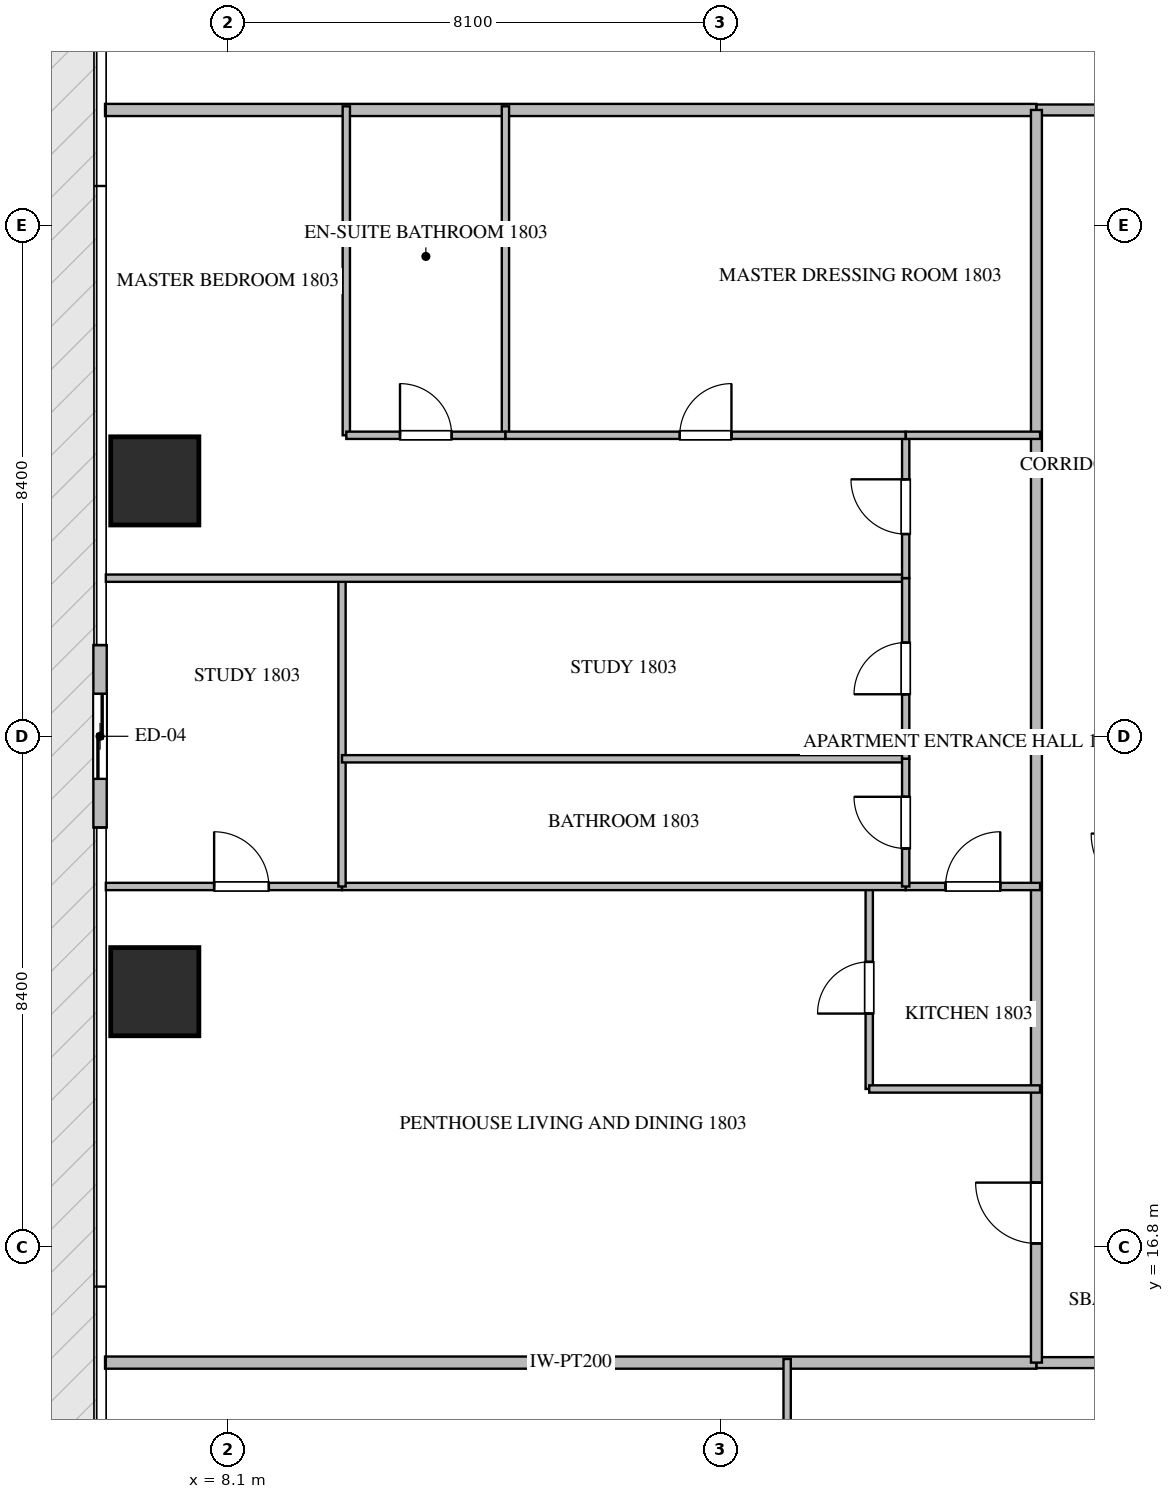
"""IFC4 building model, lengths in metres.
Left out: names, types, materials, properties, quantities, classifications, styles, units other than length and angle.
Written with IfcOpenShell. Run it as: python <this file> out.ifc"""

import sys

from ifc_helpers import new_model, si_unit, direction, frame, frame_2d, origin, origin_2d, place, context, subcontext, project, spatial, rectangle, extrude, source, transform, mapped, element, fill, save


model = new_model("IFC4")
c1 = context("Model", 3, precision=1e-05, world=origin(), true_north=direction((0.0, 1.0)))
c2 = subcontext(c1, "Body", "Model", "MODEL_VIEW")
j1 = project(units=[si_unit("LENGTHUNIT", "METRE"), si_unit("PLANEANGLEUNIT", "RADIAN")], contexts=[c1])
p1 = place(None, origin())
s1 = spatial("IfcSite", under=j1, at=p1, CompositionType="ELEMENT")
p2 = place(p1, origin())
s2 = spatial("IfcBuilding", under=s1, at=p2, CompositionType="ELEMENT")
p3 = place(p2, frame((0.0, 0.0, 75.45)))
s3 = spatial("IfcBuildingStorey", under=s2, at=p3, CompositionType="ELEMENT", Elevation=75.45)
m1 = source(origin(), c2, "Body", "SweptSolid", [
    extrude(rectangle(XDim=1.45, YDim=1.45, at=origin_2d()), origin(), (0.0, 0.0, 1.0), 3.75),
])
for number, where, z_axis, x_axis in (
    (1, (6.9, 21.0, -0.26), (0.0, 0.0, 1.0), (1.0, 0.0, 0.0)),
    (2, (6.9, 29.4, -0.26), (0.0, 0.0, 1.0), (1.0, 0.0, 0.0)),
):
    element("IfcColumn", number, at=place(p3, frame(where, z_axis=z_axis, x_axis=x_axis)), inside=s3, PredefinedType="COLUMN", context=c2, shape_type="MappedRepresentation", body=[
        mapped(m1, transform((0.0, 0.0, 0.0), scale=1.0)),
    ])
p4 = place(p3, frame((6.0, 26.7, 0.0), z_axis=(0.0, 0.0, 1.0), x_axis=(0.0, -1.0, 0.0)))
e3 = element("IfcWall", 3, at=p4, inside=s3, PredefinedType="ELEMENTEDWALL", context=c2, shape_type="SweptSolid", body=[
    extrude(rectangle(XDim=3.0, YDim=0.22, at=frame_2d((1.5, 0.0))), origin(), (0.0, 0.0, 1.0), 3.475),
])
p5 = place(p4, frame((0.8, 0.0, 0.0)))
e4 = element("IfcOpeningElement", 4, at=p5, cuts=e3, PredefinedType="OPENING", context=c2, shape_type="SweptSolid", body=[
    extrude(rectangle(XDim=1.4, YDim=2.25, at=frame_2d((0.7, 1.125))), frame((0.0, 0.12, 0.0), z_axis=(0.0, -1.0, 0.0), x_axis=(1.0, 0.0, 0.0)), (0.0, 0.0, 1.0), 0.24),
])
for number, where, z_axis, x_axis in (
    (5, (6.082, 14.9, 0.0), (0.0, 0.0, 1.0), (1.0, 0.0, 0.0)),
    (6, (6.082, 35.5, 0.0), (0.0, 0.0, 1.0), (1.0, 0.0, 0.0)),
):
    element("IfcWall", number, at=place(p3, frame(where, z_axis=z_axis, x_axis=x_axis)), inside=s3, PredefinedType="PARTITIONING", context=c2, shape_type="SweptSolid", body=[
        extrude(rectangle(XDim=15.318, YDim=0.2, at=frame_2d((7.659, 0.0))), origin(), (0.0, 0.0, 1.0), 3.49),
    ])
p6 = place(p3, frame((21.402, 14.9, 0.0), z_axis=(0.0, 0.0, 1.0), x_axis=(1.0, 0.0, 0.0)))
e7 = element("IfcWall", 7, at=p6, inside=s3, PredefinedType="PARTITIONING", context=c2, shape_type="SweptSolid", body=[
    extrude(rectangle(XDim=21.996, YDim=0.18, at=frame_2d((10.998, 0.0))), origin(), (0.0, 0.0, 1.0), 3.49),
])
p7 = place(p6, frame((7.202, 0.0, 0.0)))
e8 = element("IfcOpeningElement", 8, at=p7, cuts=e7, PredefinedType="OPENING", context=c2, shape_type="SweptSolid", body=[
    extrude(rectangle(XDim=1.0, YDim=2.15, at=frame_2d((0.5, 1.075))), frame((0.0, 0.1, 0.0), z_axis=(0.0, -1.0, 0.0), x_axis=(1.0, 0.0, 0.0)), (0.0, 0.0, 1.0), 0.2),
])
p8 = place(p3, frame((21.402, 35.5, 0.0), z_axis=(0.0, 0.0, 1.0), x_axis=(1.0, 0.0, 0.0)))
e9 = element("IfcWall", 9, at=p8, inside=s3, PredefinedType="PARTITIONING", context=c2, shape_type="SweptSolid", body=[
    extrude(rectangle(XDim=21.996, YDim=0.18, at=frame_2d((10.998, 0.0))), origin(), (0.0, 0.0, 1.0), 3.49),
])
p9 = place(p8, frame((15.222, 0.0, 0.0)))
e10 = element("IfcOpeningElement", 10, at=p9, cuts=e9, PredefinedType="OPENING", context=c2, shape_type="SweptSolid", body=[
    extrude(rectangle(XDim=1.0, YDim=2.15, at=frame_2d((0.5, 1.075))), frame((0.0, 0.1, 0.0), z_axis=(0.0, -1.0, 0.0), x_axis=(1.0, 0.0, 0.0)), (0.0, 0.0, 1.0), 0.2),
])
p10 = place(p3, frame((21.4, 14.9, 0.0), z_axis=(0.0, 0.0, 1.0), x_axis=(0.0, 1.0, 0.0)))
e11 = element("IfcWall", 11, at=p10, inside=s3, PredefinedType="PARTITIONING", context=c2, shape_type="SweptSolid", body=[
    extrude(rectangle(XDim=20.6, YDim=0.18, at=frame_2d((10.3, 0.0))), origin(), (0.0, 0.0, 1.0), 3.49),
])
p11 = place(p10, frame((1.96, 0.0, 0.0)))
e12 = element("IfcOpeningElement", 12, at=p11, cuts=e11, PredefinedType="OPENING", context=c2, shape_type="SweptSolid", body=[
    extrude(rectangle(XDim=1.0, YDim=2.15, at=frame_2d((0.5, 1.075))), frame((0.0, 0.1, 0.0), z_axis=(0.0, -1.0, 0.0), x_axis=(1.0, 0.0, 0.0)), (0.0, 0.0, 1.0), 0.2),
])
p12 = place(p3, frame((17.3, 12.752, 0.0), z_axis=(0.0, 0.0, 1.0), x_axis=(0.0, 1.0, 0.0)))
e13 = element("IfcWall", 13, at=p12, inside=s3, PredefinedType="PARTITIONING", context=c2, shape_type="SweptSolid", body=[
    extrude(rectangle(XDim=2.208, YDim=0.12, at=frame_2d((1.104, 0.0))), origin(), (0.0, 0.0, 1.0), 3.49),
])
p13 = place(p3, frame((18.65, 19.4, 0.0), z_axis=(0.0, 0.0, 1.0), x_axis=(0.0, 1.0, 0.0)))
e14 = element("IfcWall", 14, at=p13, inside=s3, PredefinedType="PARTITIONING", context=c2, shape_type="SweptSolid", body=[
    extrude(rectangle(XDim=3.33, YDim=0.12, at=frame_2d((1.665, 0.0))), origin(), (0.0, 0.0, 1.0), 3.49),
])
p14 = place(p13, frame((1.24, 0.0, 0.0)))
e15 = element("IfcOpeningElement", 15, at=p14, cuts=e14, PredefinedType="OPENING", context=c2, shape_type="SweptSolid", body=[
    extrude(rectangle(XDim=0.85, YDim=2.1, at=frame_2d((0.425, 1.05))), frame((0.0, 0.07, 0.0), z_axis=(0.0, -1.0, 0.0), x_axis=(1.0, 0.0, 0.0)), (0.0, 0.0, 1.0), 0.14),
])
p15 = place(p3, frame((18.65, 19.4, 0.0), z_axis=(0.0, 0.0, 1.0), x_axis=(1.0, 0.0, 0.0)))
e16 = element("IfcWall", 16, at=p15, inside=s3, PredefinedType="PARTITIONING", context=c2, shape_type="SweptSolid", body=[
    extrude(rectangle(XDim=2.81, YDim=0.12, at=frame_2d((1.405, 0.0))), origin(), (0.0, 0.0, 1.0), 3.49),
])
p16 = place(p3, frame((19.25, 22.73, 0.0), z_axis=(0.0, 0.0, 1.0), x_axis=(1.0, 0.0, 0.0)))
e17 = element("IfcWall", 17, at=p16, inside=s3, PredefinedType="PARTITIONING", context=c2, shape_type="SweptSolid", body=[
    extrude(rectangle(XDim=2.21, YDim=0.12, at=frame_2d((1.105, 0.0))), origin(), (0.0, 0.0, 1.0), 3.49),
])
p17 = place(p16, frame((0.655, 0.0, 0.0)))
e18 = element("IfcOpeningElement", 18, at=p17, cuts=e17, PredefinedType="OPENING", context=c2, shape_type="SweptSolid", body=[
    extrude(rectangle(XDim=0.9, YDim=2.1, at=frame_2d((0.45, 1.05))), frame((0.0, 0.07, 0.0), z_axis=(0.0, -1.0, 0.0), x_axis=(1.0, 0.0, 0.0)), (0.0, 0.0, 1.0), 0.14),
])
p18 = place(p3, frame((6.095, 22.73, 0.0), z_axis=(0.0, 0.0, 1.0), x_axis=(1.0, 0.0, 0.0)))
e19 = element("IfcWall", 19, at=p18, inside=s3, PredefinedType="PARTITIONING", context=c2, shape_type="SweptSolid", body=[
    extrude(rectangle(XDim=3.884, YDim=0.12, at=frame_2d((1.942, 0.0))), origin(), (0.0, 0.0, 1.0), 3.49),
])
p19 = place(p18, frame((1.781, 0.0, 0.0)))
e20 = element("IfcOpeningElement", 20, at=p19, cuts=e19, PredefinedType="OPENING", context=c2, shape_type="SweptSolid", body=[
    extrude(rectangle(XDim=0.9, YDim=2.1, at=frame_2d((0.45, 1.05))), frame((0.0, 0.07, 0.0), z_axis=(0.0, -1.0, 0.0), x_axis=(1.0, 0.0, 0.0)), (0.0, 0.0, 1.0), 0.14),
])
p20 = place(p3, frame((9.981, 22.73, 0.0), z_axis=(0.0, 0.0, 1.0), x_axis=(1.0, 0.0, 0.0)))
e21 = element("IfcWall", 21, at=p20, inside=s3, PredefinedType="PARTITIONING", context=c2, shape_type="SweptSolid", body=[
    extrude(rectangle(XDim=9.267, YDim=0.12, at=frame_2d((4.634, 0.0))), origin(), (0.0, 0.0, 1.0), 3.49),
])
p21 = place(p3, frame((9.979, 22.73, 0.0), z_axis=(0.0, 0.0, 1.0), x_axis=(0.0, 1.0, 0.0)))
e22 = element("IfcWall", 22, at=p21, inside=s3, PredefinedType="PARTITIONING", context=c2, shape_type="SweptSolid", body=[
    extrude(rectangle(XDim=5.07, YDim=0.12, at=frame_2d((2.535, 0.0))), origin(), (0.0, 0.0, 1.0), 3.49),
])
p22 = place(p3, frame((6.095, 27.8, 0.0), z_axis=(0.0, 0.0, 1.0), x_axis=(1.0, 0.0, 0.0)))
e23 = element("IfcWall", 23, at=p22, inside=s3, PredefinedType="PARTITIONING", context=c2, shape_type="SweptSolid", body=[
    extrude(rectangle(XDim=13.155, YDim=0.12, at=frame_2d((6.578, 0.0))), origin(), (0.0, 0.0, 1.0), 3.49),
])
p23 = place(p3, frame((9.979, 24.83, 0.0), z_axis=(0.0, 0.0, 1.0), x_axis=(1.0, 0.0, 0.0)))
e24 = element("IfcWall", 24, at=p23, inside=s3, PredefinedType="PARTITIONING", context=c2, shape_type="SweptSolid", body=[
    extrude(rectangle(XDim=9.271, YDim=0.12, at=frame_2d((4.635, 0.0))), origin(), (0.0, 0.0, 1.0), 3.49),
])
p24 = place(p3, frame((19.25, 22.73, 0.0), z_axis=(0.0, 0.0, 1.0), x_axis=(0.0, 1.0, 0.0)))
e25 = element("IfcWall", 25, at=p24, inside=s3, PredefinedType="PARTITIONING", context=c2, shape_type="SweptSolid", body=[
    extrude(rectangle(XDim=2.1, YDim=0.12, at=frame_2d((1.05, 0.0))), origin(), (0.0, 0.0, 1.0), 3.49),
])
p25 = place(p24, frame((0.625, 0.0, 0.0)))
e26 = element("IfcOpeningElement", 26, at=p25, cuts=e25, PredefinedType="OPENING", context=c2, shape_type="SweptSolid", body=[
    extrude(rectangle(XDim=0.85, YDim=2.1, at=frame_2d((0.425, 1.05))), frame((0.0, 0.07, 0.0), z_axis=(0.0, -1.0, 0.0), x_axis=(1.0, 0.0, 0.0)), (0.0, 0.0, 1.0), 0.14),
])
p26 = place(p3, frame((19.25, 24.832, 0.0), z_axis=(0.0, 0.0, 1.0), x_axis=(0.0, 1.0, 0.0)))
e27 = element("IfcWall", 27, at=p26, inside=s3, PredefinedType="PARTITIONING", context=c2, shape_type="SweptSolid", body=[
    extrude(rectangle(XDim=2.968, YDim=0.12, at=frame_2d((1.484, 0.0))), origin(), (0.0, 0.0, 1.0), 3.49),
])
p27 = place(p26, frame((1.059, 0.0, 0.0)))
e28 = element("IfcOpeningElement", 28, at=p27, cuts=e27, PredefinedType="OPENING", context=c2, shape_type="SweptSolid", body=[
    extrude(rectangle(XDim=0.85, YDim=2.1, at=frame_2d((0.425, 1.05))), frame((0.0, 0.07, 0.0), z_axis=(0.0, -1.0, 0.0), x_axis=(1.0, 0.0, 0.0)), (0.0, 0.0, 1.0), 0.14),
])
p28 = place(p3, frame((19.25, 27.802, 0.0), z_axis=(0.0, 0.0, 1.0), x_axis=(0.0, 1.0, 0.0)))
e29 = element("IfcWall", 29, at=p28, inside=s3, PredefinedType="PARTITIONING", context=c2, shape_type="SweptSolid", body=[
    extrude(rectangle(XDim=2.348, YDim=0.12, at=frame_2d((1.174, 0.0))), origin(), (0.0, 0.0, 1.0), 3.49),
])
p29 = place(p28, frame((0.724, 0.0, 0.0)))
e30 = element("IfcOpeningElement", 30, at=p29, cuts=e29, PredefinedType="OPENING", context=c2, shape_type="SweptSolid", body=[
    extrude(rectangle(XDim=0.9, YDim=2.1, at=frame_2d((0.45, 1.05))), frame((0.0, 0.07, 0.0), z_axis=(0.0, -1.0, 0.0), x_axis=(1.0, 0.0, 0.0)), (0.0, 0.0, 1.0), 0.14),
])
for number, where, z_axis, x_axis in (
    (31, (10.05, 30.15, 0.0), (0.0, 0.0, 1.0), (0.0, 1.0, 0.0)),
    (32, (12.667, 30.15, 0.0), (0.0, 0.0, 1.0), (0.0, 1.0, 0.0)),
):
    element("IfcWall", number, at=place(p3, frame(where, z_axis=z_axis, x_axis=x_axis)), inside=s3, PredefinedType="PARTITIONING", context=c2, shape_type="SweptSolid", body=[
        extrude(rectangle(XDim=5.41, YDim=0.12, at=frame_2d((2.705, 0.0))), origin(), (0.0, 0.0, 1.0), 3.49),
    ])
p30 = place(p3, frame((10.05, 30.15, 0.0), z_axis=(0.0, 0.0, 1.0), x_axis=(1.0, 0.0, 0.0)))
e33 = element("IfcWall", 33, at=p30, inside=s3, PredefinedType="PARTITIONING", context=c2, shape_type="SweptSolid", body=[
    extrude(rectangle(XDim=2.617, YDim=0.12, at=frame_2d((1.309, 0.0))), origin(), (0.0, 0.0, 1.0), 3.49),
])
p31 = place(p30, frame((0.883, 0.0, 0.0)))
e34 = element("IfcOpeningElement", 34, at=p31, cuts=e33, PredefinedType="OPENING", context=c2, shape_type="SweptSolid", body=[
    extrude(rectangle(XDim=0.85, YDim=2.1, at=frame_2d((0.425, 1.05))), frame((0.0, 0.07, 0.0), z_axis=(0.0, -1.0, 0.0), x_axis=(1.0, 0.0, 0.0)), (0.0, 0.0, 1.0), 0.14),
])
p32 = place(p3, frame((12.669, 30.15, 0.0), z_axis=(0.0, 0.0, 1.0), x_axis=(1.0, 0.0, 0.0)))
e35 = element("IfcWall", 35, at=p32, inside=s3, PredefinedType="PARTITIONING", context=c2, shape_type="SweptSolid", body=[
    extrude(rectangle(XDim=6.581, YDim=0.12, at=frame_2d((3.291, 0.0))), origin(), (0.0, 0.0, 1.0), 3.49),
])
p33 = place(p32, frame((2.865, 0.0, 0.0)))
e36 = element("IfcOpeningElement", 36, at=p33, cuts=e35, PredefinedType="OPENING", context=c2, shape_type="SweptSolid", body=[
    extrude(rectangle(XDim=0.85, YDim=2.1, at=frame_2d((0.425, 1.05))), frame((0.0, 0.07, 0.0), z_axis=(0.0, -1.0, 0.0), x_axis=(1.0, 0.0, 0.0)), (0.0, 0.0, 1.0), 0.14),
])
p34 = place(p3, frame((19.252, 30.15, 0.0), z_axis=(0.0, 0.0, 1.0), x_axis=(1.0, 0.0, 0.0)))
e37 = element("IfcWall", 37, at=p34, inside=s3, PredefinedType="PARTITIONING", context=c2, shape_type="SweptSolid", body=[
    extrude(rectangle(XDim=2.208, YDim=0.12, at=frame_2d((1.104, 0.0))), origin(), (0.0, 0.0, 1.0), 3.49),
])
m2 = source(origin(), c2, "Body", "SweptSolid", [
    extrude(rectangle(XDim=1.4, YDim=2.25, at=frame_2d((0.7, 1.125))), frame((0.0, 0.025, 0.0), z_axis=(0.0, -1.0, 0.0), x_axis=(1.0, 0.0, 0.0)), (0.0, 0.0, 1.0), 0.05),
])
p35 = place(p5, origin())
e38 = element("IfcDoor", 38, at=p35, inside=s3, OperationType="SLIDING_TO_LEFT", PredefinedType="DOOR", context=c2, shape_type="MappedRepresentation", body=[
    mapped(m2, transform((0.0, 0.0, 0.0), scale=1.0)),
])
fill(e4, e38)
m3 = source(origin(), c2, "Body", "SweptSolid", [
    extrude(rectangle(XDim=1.0, YDim=2.15, at=frame_2d((0.5, 1.075))), frame((0.0, 0.025, 0.0), z_axis=(0.0, -1.0, 0.0), x_axis=(1.0, 0.0, 0.0)), (0.0, 0.0, 1.0), 0.05),
])
p36 = place(p11, origin())
e39 = element("IfcDoor", 39, at=p36, inside=s3, OperationType="SINGLE_SWING_RIGHT", PredefinedType="DOOR", context=c2, shape_type="MappedRepresentation", body=[
    mapped(m3, transform((0.0, 0.0, 0.0), scale=1.0)),
])
fill(e12, e39)
m4 = source(origin(), c2, "Body", "SweptSolid", [
    extrude(rectangle(XDim=0.85, YDim=2.1, at=frame_2d((0.425, 1.05))), frame((0.0, 0.025, 0.0), z_axis=(0.0, -1.0, 0.0), x_axis=(1.0, 0.0, 0.0)), (0.0, 0.0, 1.0), 0.05),
])
p37 = place(p14, origin())
e40 = element("IfcDoor", 40, at=p37, inside=s3, OperationType="SINGLE_SWING_LEFT", PredefinedType="DOOR", context=c2, shape_type="MappedRepresentation", body=[
    mapped(m4, transform((0.0, 0.0, 0.0), scale=1.0)),
])
fill(e15, e40)
m5 = source(origin(), c2, "Body", "SweptSolid", [
    extrude(rectangle(XDim=0.9, YDim=2.1, at=frame_2d((0.45, 1.05))), frame((0.0, 0.025, 0.0), z_axis=(0.0, -1.0, 0.0), x_axis=(1.0, 0.0, 0.0)), (0.0, 0.0, 1.0), 0.05),
])
p38 = place(p17, origin())
e41 = element("IfcDoor", 41, at=p38, inside=s3, OperationType="SINGLE_SWING_RIGHT", PredefinedType="DOOR", context=c2, shape_type="MappedRepresentation", body=[
    mapped(m5, transform((0.0, 0.0, 0.0), scale=1.0)),
])
fill(e18, e41)
p39 = place(p19, origin())
e42 = element("IfcDoor", 42, at=p39, inside=s3, OperationType="SINGLE_SWING_LEFT", PredefinedType="DOOR", context=c2, shape_type="MappedRepresentation", body=[
    mapped(m5, transform((0.0, 0.0, 0.0), scale=1.0)),
])
fill(e20, e42)
p40 = place(p25, origin())
e43 = element("IfcDoor", 43, at=p40, inside=s3, OperationType="SINGLE_SWING_RIGHT", PredefinedType="DOOR", context=c2, shape_type="MappedRepresentation", body=[
    mapped(m4, transform((0.0, 0.0, 0.0), scale=1.0)),
])
fill(e26, e43)
p41 = place(p27, origin())
e44 = element("IfcDoor", 44, at=p41, inside=s3, OperationType="SINGLE_SWING_LEFT", PredefinedType="DOOR", context=c2, shape_type="MappedRepresentation", body=[
    mapped(m4, transform((0.0, 0.0, 0.0), scale=1.0)),
])
fill(e28, e44)
p42 = place(p29, origin())
e45 = element("IfcDoor", 45, at=p42, inside=s3, OperationType="SINGLE_SWING_RIGHT", PredefinedType="DOOR", context=c2, shape_type="MappedRepresentation", body=[
    mapped(m5, transform((0.0, 0.0, 0.0), scale=1.0)),
])
fill(e30, e45)
p43 = place(p31, origin())
e46 = element("IfcDoor", 46, at=p43, inside=s3, OperationType="SINGLE_SWING_LEFT", PredefinedType="DOOR", context=c2, shape_type="MappedRepresentation", body=[
    mapped(m4, transform((0.0, 0.0, 0.0), scale=1.0)),
])
fill(e34, e46)
p44 = place(p33, origin())
e47 = element("IfcDoor", 47, at=p44, inside=s3, OperationType="SINGLE_SWING_RIGHT", PredefinedType="DOOR", context=c2, shape_type="MappedRepresentation", body=[
    mapped(m4, transform((0.0, 0.0, 0.0), scale=1.0)),
])
fill(e36, e47)
save(model, sys.argv[1])
